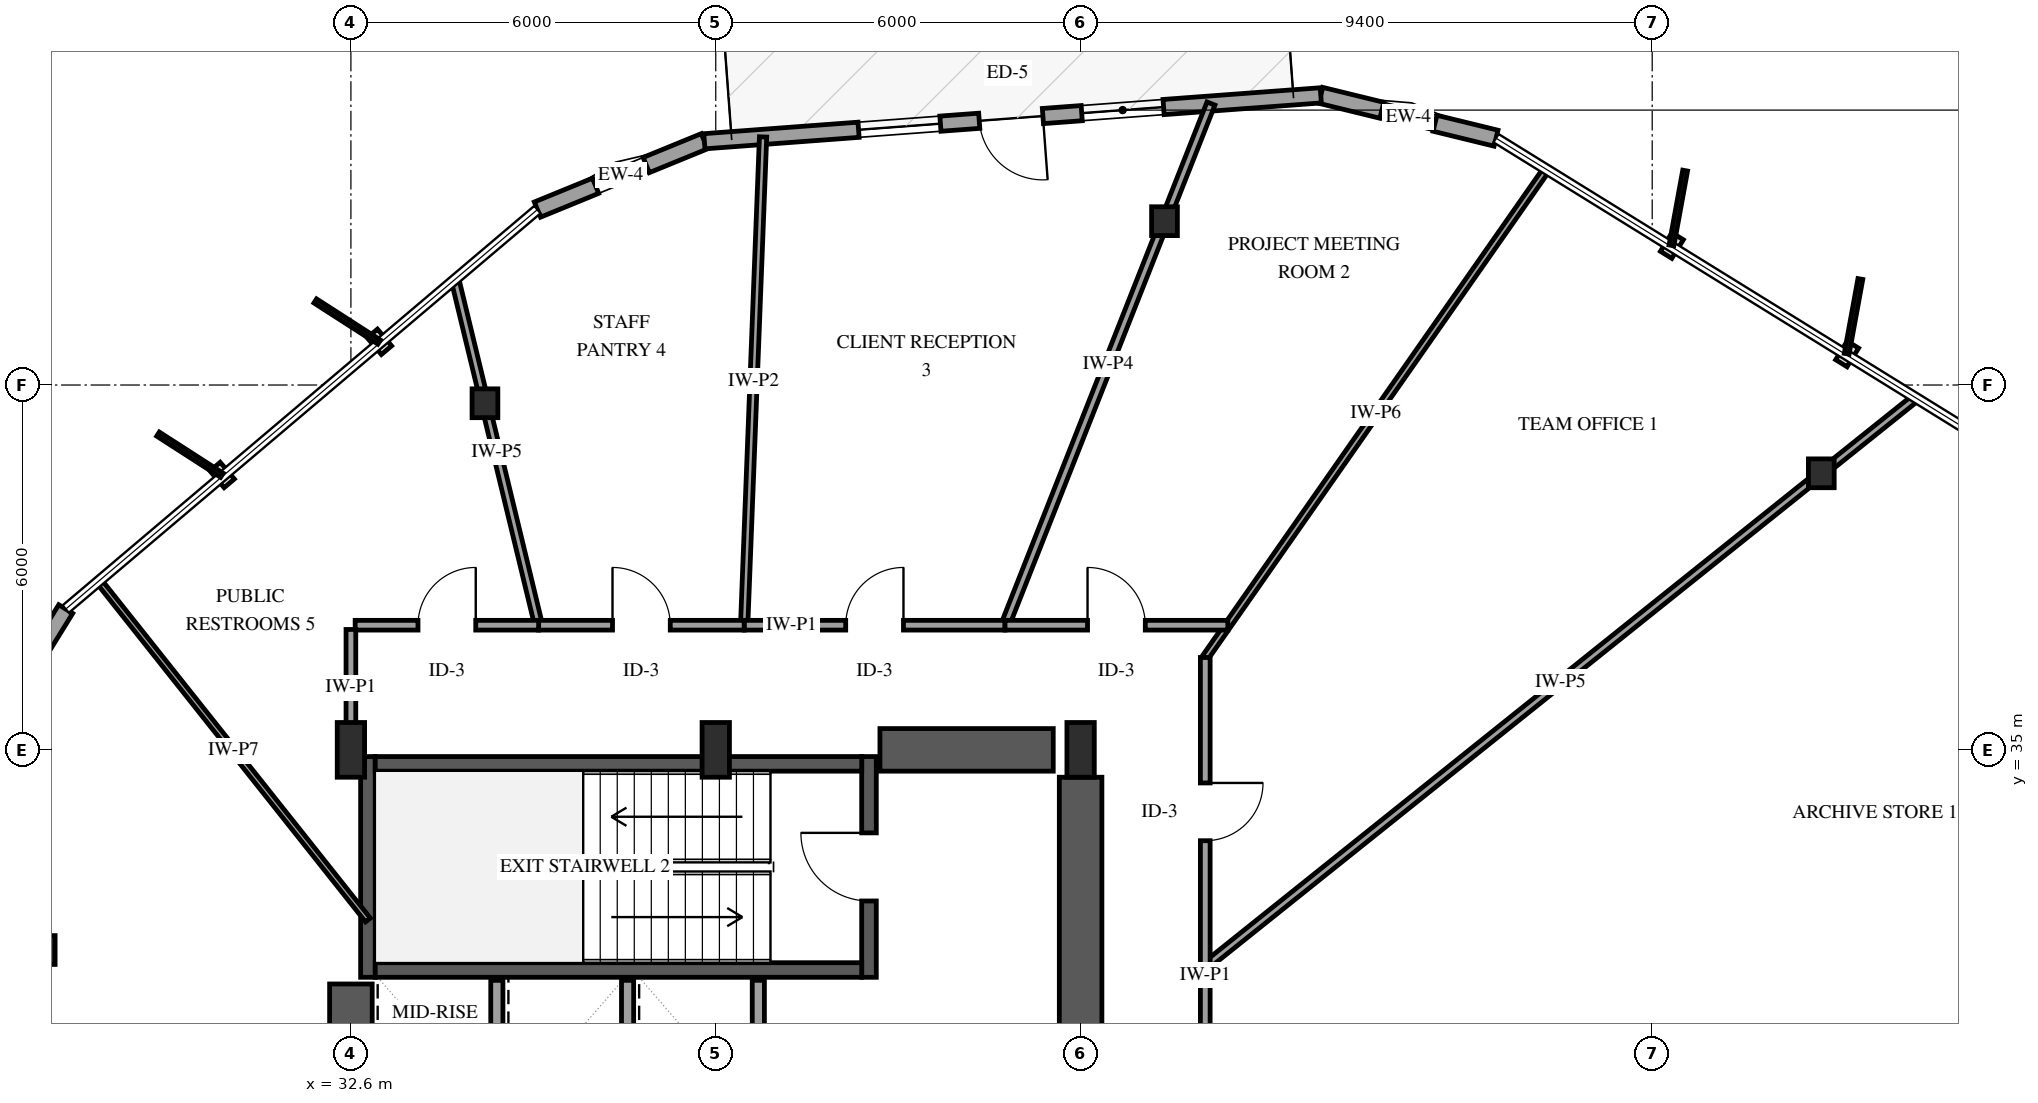
"""IFC4 building model, lengths in metres.
Left out: names, types, materials, properties, quantities, classifications, styles, units other than length and angle.
Written with IfcOpenShell. Run it as: python <this file> out.ifc"""

import sys

from ifc_helpers import new_model, si_unit, direction, frame, frame_2d, origin, origin_2d, place, context, subcontext, project, spatial, rectangle, i_section, extrude, element, fill, save


model = new_model("IFC4")
c1 = context("Model", 3, precision=1e-05, world=origin(), true_north=direction((0.0, 1.0)))
c2 = subcontext(c1, "Body", "Model", "MODEL_VIEW")
j1 = project(units=[si_unit("LENGTHUNIT", "METRE"), si_unit("PLANEANGLEUNIT", "RADIAN")], contexts=[c1])
p1 = place(None, origin())
s1 = spatial("IfcSite", under=j1, at=p1, CompositionType="ELEMENT")
p2 = place(p1, origin())
s2 = spatial("IfcBuilding", under=s1, at=p2, CompositionType="ELEMENT")
p3 = place(p2, frame((0.0, 0.0, 46.6)))
s3 = spatial("IfcBuildingStorey", under=s2, at=p3, CompositionType="ELEMENT", Elevation=46.6)
p4 = place(p3, frame((32.88, 31.26, 0.0), z_axis=(0.0, 0.0, 1.0), x_axis=(0.0, 1.0, 0.0)))
e1 = element("IfcWall", 1, at=p4, inside=s3, PredefinedType="SHEAR", context=c2, shape_type="SweptSolid", body=[
    extrude(rectangle(XDim=3.63, YDim=0.24, at=frame_2d((1.815, 0.0))), origin(), (0.0, 0.0, 1.0), 4.0),
])
p5 = place(p3, frame((41.12, 31.26, 0.0), z_axis=(0.0, 0.0, 1.0), x_axis=(0.0, 1.0, 0.0)))
e2 = element("IfcWall", 2, at=p5, inside=s3, PredefinedType="SHEAR", context=c2, shape_type="SweptSolid", body=[
    extrude(rectangle(XDim=3.63, YDim=0.24, at=frame_2d((1.815, 0.0))), origin(), (0.0, 0.0, 1.0), 4.0),
])
p6 = place(p5, frame((1.255, 0.0, 0.0)))
e3 = element("IfcOpeningElement", 3, at=p6, cuts=e2, PredefinedType="OPENING", context=c2, shape_type="SweptSolid", body=[
    extrude(rectangle(XDim=1.12, YDim=2.15, at=frame_2d((0.56, 1.075))), frame((0.0, 0.13, 0.0), z_axis=(0.0, -1.0, 0.0), x_axis=(1.0, 0.0, 0.0)), (0.0, 0.0, 1.0), 0.26),
])
for number, where, z_axis, x_axis in (
    (4, (33.0, 31.38, 0.0), (0.0, 0.0, 1.0), (1.0, 0.0, 0.0)),
    (5, (33.0, 34.77, 0.0), (0.0, 0.0, 1.0), (1.0, 0.0, 0.0)),
):
    element("IfcWall", number, at=place(p3, frame(where, z_axis=z_axis, x_axis=x_axis)), inside=s3, PredefinedType="SHEAR", context=c2, shape_type="SweptSolid", body=[
        extrude(rectangle(XDim=8.0, YDim=0.24, at=frame_2d((4.0, 0.0))), origin(), (0.0, 0.0, 1.0), 4.0),
    ])
p7 = place(p3, frame((32.6, 18.85, 0.0), z_axis=(0.0, 0.0, 1.0), x_axis=(0.0, 1.0, 0.0)))
e6 = element("IfcWall", 6, at=p7, inside=s3, PredefinedType="SHEAR", context=c2, shape_type="SweptSolid", body=[
    extrude(rectangle(XDim=12.3, YDim=0.7, at=frame_2d((6.15, 0.0))), origin(), (0.0, 0.0, 1.0), 4.0),
])
p8 = place(p3, frame((41.3, 35.0, 0.0), z_axis=(0.0, 0.0, 1.0), x_axis=(1.0, 0.0, 0.0)))
e7 = element("IfcWall", 7, at=p8, inside=s3, PredefinedType="SHEAR", context=c2, shape_type="SweptSolid", body=[
    extrude(rectangle(XDim=2.85, YDim=0.7, at=frame_2d((1.425, 0.0))), origin(), (0.0, 0.0, 1.0), 4.0),
])
p9 = place(p3, frame((44.6, 29.8, 0.0), z_axis=(0.0, 0.0, 1.0), x_axis=(0.0, 1.0, 0.0)))
e8 = element("IfcWall", 8, at=p9, inside=s3, PredefinedType="SHEAR", context=c2, shape_type="SweptSolid", body=[
    extrude(rectangle(XDim=4.75, YDim=0.7, at=frame_2d((2.375, 0.0))), origin(), (0.0, 0.0, 1.0), 4.0),
])
for number, where, z_axis, x_axis in (
    (9, (32.6, 35.0, 0.0), (0.0, 0.0, 1.0), (1.0, 0.0, 0.0)),
    (10, (38.6, 35.0, 0.0), (0.0, 0.0, 1.0), (1.0, 0.0, 0.0)),
    (11, (44.6, 35.0, 0.0), (0.0, 0.0, 1.0), (1.0, 0.0, 0.0)),
):
    element("IfcColumn", number, at=place(p3, frame(where, z_axis=z_axis, x_axis=x_axis)), inside=s3, PredefinedType="PILASTER", context=c2, shape_type="SweptSolid", body=[
        extrude(rectangle(XDim=0.45, YDim=0.9, at=origin_2d()), origin(), (0.0, 0.0, 1.0), 4.0),
    ])
for number, where, z_axis, x_axis in (
    (12, (56.781, 39.548, 0.0), (0.0, 0.0, 1.0), (1.0, 0.0, 0.0)),
    (13, (45.98, 43.694, 0.0), (0.0, 0.0, 1.0), (1.0, 0.0, 0.0)),
    (14, (34.804, 40.7, 0.0), (0.0, 0.0, 1.0), (1.0, 0.0, 0.0)),
    (15, (27.523, 31.708, 0.0), (0.0, 0.0, 1.0), (1.0, 0.0, 0.0)),
):
    element("IfcColumn", number, at=place(p3, frame(where, z_axis=z_axis, x_axis=x_axis)), inside=s3, PredefinedType="COLUMN", context=c2, shape_type="SweptSolid", body=[
        extrude(i_section(OverallWidth=0.424, OverallDepth=0.474, WebThickness=0.048, FlangeThickness=0.077, FilletRadius=0.038, at=origin_2d()), origin(), (0.0, 0.0, 1.0), 4.0),
    ])
p10 = place(p3, frame((51.432, 45.059, 0.0), z_axis=(0.0, 0.0, 1.0), x_axis=(-0.971383395834, 0.237516943182, 0.0)))
e16 = element("IfcWall", 16, at=p10, inside=s3, PredefinedType="SOLIDWALL", context=c2, shape_type="SweptSolid", body=[
    extrude(rectangle(XDim=2.967, YDim=0.27, at=frame_2d((1.483, 0.0))), origin(), (0.0, 0.0, 1.0), 3.079),
])
p11 = place(p10, frame((1.033, 0.0, 0.75)))
e17 = element("IfcOpeningElement", 17, at=p11, cuts=e16, PredefinedType="OPENING", context=c2, shape_type="SweptSolid", body=[
    extrude(rectangle(XDim=0.9, YDim=1.5, at=frame_2d((0.45, 0.75))), frame((0.0, 0.145, 0.0), z_axis=(0.0, -1.0, 0.0), x_axis=(1.0, 0.0, 0.0)), (0.0, 0.0, 1.0), 0.29),
])
p12 = place(p3, frame((38.413, 45.009, 0.0), z_axis=(0.0, 0.0, 1.0), x_axis=(-0.925495818017, -0.378757826102, 0.0)))
e18 = element("IfcWall", 18, at=p12, inside=s3, PredefinedType="SOLIDWALL", context=c2, shape_type="SweptSolid", body=[
    extrude(rectangle(XDim=2.966, YDim=0.27, at=frame_2d((1.483, 0.0))), origin(), (0.0, 0.0, 1.0), 3.079),
])
p13 = place(p12, frame((1.033, 0.0, 0.75)))
e19 = element("IfcOpeningElement", 19, at=p13, cuts=e18, PredefinedType="OPENING", context=c2, shape_type="SweptSolid", body=[
    extrude(rectangle(XDim=0.9, YDim=1.5, at=frame_2d((0.45, 0.75))), frame((0.0, 0.145, 0.0), z_axis=(0.0, -1.0, 0.0), x_axis=(1.0, 0.0, 0.0)), (0.0, 0.0, 1.0), 0.29),
])
p14 = place(p3, frame((48.55, 45.764, 0.0), z_axis=(0.0, 0.0, 1.0), x_axis=(-0.997237065948, -0.07428481877, 0.0)))
e20 = element("IfcWall", 20, at=p14, inside=s3, PredefinedType="SOLIDWALL", context=c2, shape_type="SweptSolid", body=[
    extrude(rectangle(XDim=10.165, YDim=0.25, at=frame_2d((5.083, 0.0))), origin(), (0.0, 0.0, 1.0), 3.079),
])
p15 = place(p14, frame((4.583, 0.0, 0.0)))
e21 = element("IfcOpeningElement", 21, at=p15, cuts=e20, PredefinedType="OPENING", context=c2, shape_type="SweptSolid", body=[
    extrude(rectangle(XDim=1.05, YDim=2.15, at=frame_2d((0.525, 1.075))), frame((0.0, 0.135, 0.0), z_axis=(0.0, -1.0, 0.0), x_axis=(1.0, 0.0, 0.0)), (0.0, 0.0, 1.0), 0.27),
])
p16 = place(p14, frame((2.593, 0.0, 0.72)))
e22 = element("IfcOpeningElement", 22, at=p16, cuts=e20, PredefinedType="OPENING", context=c2, shape_type="SweptSolid", body=[
    extrude(rectangle(XDim=1.35, YDim=1.65, at=frame_2d((0.675, 0.825))), frame((0.0, 0.135, 0.0), z_axis=(0.0, -1.0, 0.0), x_axis=(1.0, 0.0, 0.0)), (0.0, 0.0, 1.0), 0.27),
])
p17 = place(p14, frame((6.273, 0.0, 0.72)))
e23 = element("IfcOpeningElement", 23, at=p17, cuts=e20, PredefinedType="OPENING", context=c2, shape_type="SweptSolid", body=[
    extrude(rectangle(XDim=1.35, YDim=1.65, at=frame_2d((0.675, 0.825))), frame((0.0, 0.135, 0.0), z_axis=(0.0, -1.0, 0.0), x_axis=(1.0, 0.0, 0.0)), (0.0, 0.0, 1.0), 0.27),
])
p18 = place(p3, frame((27.91, 37.315, 0.0), z_axis=(0.0, 0.0, 1.0), x_axis=(-0.526042929665, -0.850458015513, 0.0)))
e24 = element("IfcWall", 24, at=p18, inside=s3, PredefinedType="SOLIDWALL", context=c2, shape_type="SweptSolid", body=[
    extrude(rectangle(XDim=2.967, YDim=0.27, at=frame_2d((1.483, 0.0))), origin(), (0.0, 0.0, 1.0), 3.079),
])
p19 = place(p18, frame((1.033, 0.0, 0.75)))
e25 = element("IfcOpeningElement", 25, at=p19, cuts=e24, PredefinedType="OPENING", context=c2, shape_type="SweptSolid", body=[
    extrude(rectangle(XDim=0.9, YDim=1.5, at=frame_2d((0.45, 0.75))), frame((0.0, 0.145, 0.0), z_axis=(0.0, -1.0, 0.0), x_axis=(1.0, 0.0, 0.0)), (0.0, 0.0, 1.0), 0.29),
])
for number, where, z_axis, x_axis in (
    (26, (35.0, 29.11, 0.0), (0.0, 0.0, 1.0), (0.0, 1.0, 0.0)),
    (27, (37.15, 29.11, 0.0), (0.0, 0.0, 1.0), (0.0, 1.0, 0.0)),
    (28, (39.3, 29.11, 0.0), (0.0, 0.0, 1.0), (0.0, 1.0, 0.0)),
):
    element("IfcWall", number, at=place(p3, frame(where, z_axis=z_axis, x_axis=x_axis)), inside=s3, PredefinedType="SOLIDWALL", context=c2, shape_type="SweptSolid", body=[
        extrude(rectangle(XDim=2.1, YDim=0.2, at=frame_2d((1.05, 0.0))), origin(), (0.0, 0.0, 1.0), 3.7),
    ])
p20 = place(p3, frame((46.65, 31.442, 0.0), z_axis=(0.0, 0.0, 1.0), x_axis=(0.780814683149, 0.624762699414, 0.0)))
e29 = element("IfcWall", 29, at=p20, inside=s3, PredefinedType="PARTITIONING", context=c2, shape_type="SweptSolid", body=[
    extrude(rectangle(XDim=14.963, YDim=0.13, at=frame_2d((7.481, 0.0))), origin(), (0.0, 0.0, 1.0), 3.7),
])
p21 = place(p3, frame((46.65, 36.519, 0.0), z_axis=(0.0, 0.0, 1.0), x_axis=(0.5729335383, 0.81960183058, 0.0)))
e30 = element("IfcWall", 30, at=p21, inside=s3, PredefinedType="PARTITIONING", context=c2, shape_type="SweptSolid", body=[
    extrude(rectangle(XDim=9.794, YDim=0.11, at=frame_2d((4.897, 0.0))), origin(), (0.0, 0.0, 1.0), 3.7),
])
p22 = place(p3, frame((43.357, 37.05, 0.0), z_axis=(0.0, 0.0, 1.0), x_axis=(0.367220172229, 0.930134046849, 0.0)))
e31 = element("IfcWall", 31, at=p22, inside=s3, PredefinedType="PARTITIONING", context=c2, shape_type="SweptSolid", body=[
    extrude(rectangle(XDim=9.223, YDim=0.14, at=frame_2d((4.612, 0.0))), origin(), (0.0, 0.0, 1.0), 2.995),
])
p23 = place(p3, frame((39.067, 37.05, 0.0), z_axis=(0.0, 0.0, 1.0), x_axis=(0.038704976086, 0.999250681674, 0.0)))
e32 = element("IfcWall", 32, at=p23, inside=s3, PredefinedType="PARTITIONING", context=c2, shape_type="SweptSolid", body=[
    extrude(rectangle(XDim=8.036, YDim=0.12, at=frame_2d((4.018, 0.0))), origin(), (0.0, 0.0, 1.0), 3.7),
])
p24 = place(p3, frame((32.88, 32.202, 0.0), z_axis=(0.0, 0.0, 1.0), x_axis=(-0.62182955162, 0.783152608839, 0.0)))
e33 = element("IfcWall", 33, at=p24, inside=s3, PredefinedType="PARTITIONING", context=c2, shape_type="SweptSolid", body=[
    extrude(rectangle(XDim=7.117, YDim=0.1, at=frame_2d((3.559, 0.0))), origin(), (0.0, 0.0, 1.0), 3.7),
])
p25 = place(p3, frame((35.687, 37.05, 0.0), z_axis=(0.0, 0.0, 1.0), x_axis=(-0.235165303417, 0.971955389958, 0.0)))
e34 = element("IfcWall", 34, at=p25, inside=s3, PredefinedType="PARTITIONING", context=c2, shape_type="SweptSolid", body=[
    extrude(rectangle(XDim=5.851, YDim=0.13, at=frame_2d((2.926, 0.0))), origin(), (0.0, 0.0, 1.0), 2.995),
])
p26 = place(p3, frame((46.65, 36.519, 0.0), z_axis=(0.0, 0.0, 1.0), x_axis=(0.0, -1.0, 0.0)))
e35 = element("IfcWall", 35, at=p26, inside=s3, PredefinedType="PARTITIONING", context=c2, shape_type="SweptSolid", body=[
    extrude(rectangle(XDim=5.077, YDim=0.16, at=frame_2d((2.539, 0.0))), origin(), (0.0, 0.0, 1.0), 3.7),
])
p27 = place(p26, frame((2.063, 0.0, 0.0)))
e36 = element("IfcOpeningElement", 36, at=p27, cuts=e35, PredefinedType="OPENING", context=c2, shape_type="SweptSolid", body=[
    extrude(rectangle(XDim=0.95, YDim=2.15, at=frame_2d((0.475, 1.075))), frame((0.0, 0.09, 0.0), z_axis=(0.0, -1.0, 0.0), x_axis=(1.0, 0.0, 0.0)), (0.0, 0.0, 1.0), 0.18),
])
p28 = place(p3, frame((46.65, 31.442, 0.0), z_axis=(0.0, 0.0, 1.0), x_axis=(0.0, -1.0, 0.0)))
e37 = element("IfcWall", 37, at=p28, inside=s3, PredefinedType="PARTITIONING", context=c2, shape_type="SweptSolid", body=[
    extrude(rectangle(XDim=4.849, YDim=0.16, at=frame_2d((2.424, 0.0))), origin(), (0.0, 0.0, 1.0), 3.7),
])
p29 = place(p28, frame((1.95, 0.0, 0.0)))
e38 = element("IfcOpeningElement", 38, at=p29, cuts=e37, PredefinedType="OPENING", context=c2, shape_type="SweptSolid", body=[
    extrude(rectangle(XDim=0.95, YDim=2.15, at=frame_2d((0.475, 1.075))), frame((0.0, 0.09, 0.0), z_axis=(0.0, -1.0, 0.0), x_axis=(1.0, 0.0, 0.0)), (0.0, 0.0, 1.0), 0.18),
])
p30 = place(p3, frame((39.067, 37.05, 0.0), z_axis=(0.0, 0.0, 1.0), x_axis=(1.0, 0.0, 0.0)))
e39 = element("IfcWall", 39, at=p30, inside=s3, PredefinedType="PARTITIONING", context=c2, shape_type="SweptSolid", body=[
    extrude(rectangle(XDim=4.29, YDim=0.16, at=frame_2d((2.145, 0.0))), origin(), (0.0, 0.0, 1.0), 3.7),
])
p31 = place(p30, frame((1.67, 0.0, 0.0)))
e40 = element("IfcOpeningElement", 40, at=p31, cuts=e39, PredefinedType="OPENING", context=c2, shape_type="SweptSolid", body=[
    extrude(rectangle(XDim=0.95, YDim=2.15, at=frame_2d((0.475, 1.075))), frame((0.0, 0.09, 0.0), z_axis=(0.0, -1.0, 0.0), x_axis=(1.0, 0.0, 0.0)), (0.0, 0.0, 1.0), 0.18),
])
p32 = place(p3, frame((43.357, 37.05, 0.0), z_axis=(0.0, 0.0, 1.0), x_axis=(1.0, 0.0, 0.0)))
e41 = element("IfcWall", 41, at=p32, inside=s3, PredefinedType="PARTITIONING", context=c2, shape_type="SweptSolid", body=[
    extrude(rectangle(XDim=3.664, YDim=0.16, at=frame_2d((1.832, 0.0))), origin(), (0.0, 0.0, 1.0), 3.7),
])
p33 = place(p32, frame((1.357, 0.0, 0.0)))
e42 = element("IfcOpeningElement", 42, at=p33, cuts=e41, PredefinedType="OPENING", context=c2, shape_type="SweptSolid", body=[
    extrude(rectangle(XDim=0.95, YDim=2.15, at=frame_2d((0.475, 1.075))), frame((0.0, 0.09, 0.0), z_axis=(0.0, -1.0, 0.0), x_axis=(1.0, 0.0, 0.0)), (0.0, 0.0, 1.0), 0.18),
])
p34 = place(p3, frame((35.687, 37.05, 0.0), z_axis=(0.0, 0.0, 1.0), x_axis=(1.0, 0.0, 0.0)))
e43 = element("IfcWall", 43, at=p34, inside=s3, PredefinedType="PARTITIONING", context=c2, shape_type="SweptSolid", body=[
    extrude(rectangle(XDim=3.38, YDim=0.16, at=frame_2d((1.69, 0.0))), origin(), (0.0, 0.0, 1.0), 3.7),
])
p35 = place(p34, frame((1.215, 0.0, 0.0)))
e44 = element("IfcOpeningElement", 44, at=p35, cuts=e43, PredefinedType="OPENING", context=c2, shape_type="SweptSolid", body=[
    extrude(rectangle(XDim=0.95, YDim=2.15, at=frame_2d((0.475, 1.075))), frame((0.0, 0.09, 0.0), z_axis=(0.0, -1.0, 0.0), x_axis=(1.0, 0.0, 0.0)), (0.0, 0.0, 1.0), 0.18),
])
p36 = place(p3, frame((32.67, 37.05, 0.0), z_axis=(0.0, 0.0, 1.0), x_axis=(1.0, 0.0, 0.0)))
e45 = element("IfcWall", 45, at=p36, inside=s3, PredefinedType="PARTITIONING", context=c2, shape_type="SweptSolid", body=[
    extrude(rectangle(XDim=3.017, YDim=0.16, at=frame_2d((1.509, 0.0))), origin(), (0.0, 0.0, 1.0), 3.7),
])
p37 = place(p36, frame((1.033, 0.0, 0.0)))
e46 = element("IfcOpeningElement", 46, at=p37, cuts=e45, PredefinedType="OPENING", context=c2, shape_type="SweptSolid", body=[
    extrude(rectangle(XDim=0.95, YDim=2.15, at=frame_2d((0.475, 1.075))), frame((0.0, 0.09, 0.0), z_axis=(0.0, -1.0, 0.0), x_axis=(1.0, 0.0, 0.0)), (0.0, 0.0, 1.0), 0.18),
])
p38 = place(p3, frame((32.6, 35.07, 0.0), z_axis=(0.0, 0.0, 1.0), x_axis=(0.0, 1.0, 0.0)))
e47 = element("IfcWall", 47, at=p38, inside=s3, PredefinedType="PARTITIONING", context=c2, shape_type="SweptSolid", body=[
    extrude(rectangle(XDim=1.91, YDim=0.16, at=frame_2d((0.955, 0.0))), origin(), (0.0, 0.0, 1.0), 3.7),
])
p39 = place(p11, origin())
e48 = element("IfcWindow", 48, at=p39, inside=s3, PartitioningType="SINGLE_PANEL", PredefinedType="WINDOW", context=c2, shape_type="SweptSolid", body=[
    extrude(rectangle(XDim=0.9, YDim=1.5, at=frame_2d((0.45, 0.75))), frame((0.0, 0.03, 0.0), z_axis=(0.0, -1.0, 0.0), x_axis=(1.0, 0.0, 0.0)), (0.0, 0.0, 1.0), 0.06),
])
fill(e17, e48)
p40 = place(p13, origin())
e49 = element("IfcWindow", 49, at=p40, inside=s3, PartitioningType="SINGLE_PANEL", PredefinedType="WINDOW", context=c2, shape_type="SweptSolid", body=[
    extrude(rectangle(XDim=0.9, YDim=1.5, at=frame_2d((0.45, 0.75))), frame((0.0, 0.03, 0.0), z_axis=(0.0, -1.0, 0.0), x_axis=(1.0, 0.0, 0.0)), (0.0, 0.0, 1.0), 0.06),
])
fill(e19, e49)
p41 = place(p15, origin())
e50 = element("IfcDoor", 50, at=p41, inside=s3, OperationType="SINGLE_SWING_LEFT", PredefinedType="DOOR", context=c2, shape_type="SweptSolid", body=[
    extrude(rectangle(XDim=1.05, YDim=2.15, at=frame_2d((0.525, 1.075))), frame((0.0, 0.025, 0.0), z_axis=(0.0, -1.0, 0.0), x_axis=(1.0, 0.0, 0.0)), (0.0, 0.0, 1.0), 0.05),
])
fill(e21, e50)
p42 = place(p16, origin())
e51 = element("IfcWindow", 51, at=p42, inside=s3, PartitioningType="SINGLE_PANEL", PredefinedType="WINDOW", context=c2, shape_type="SweptSolid", body=[
    extrude(rectangle(XDim=1.35, YDim=1.65, at=frame_2d((0.675, 0.825))), frame((0.0, 0.03, 0.0), z_axis=(0.0, -1.0, 0.0), x_axis=(1.0, 0.0, 0.0)), (0.0, 0.0, 1.0), 0.06),
])
fill(e22, e51)
p43 = place(p17, origin())
e52 = element("IfcWindow", 52, at=p43, inside=s3, PartitioningType="SINGLE_PANEL", PredefinedType="WINDOW", context=c2, shape_type="SweptSolid", body=[
    extrude(rectangle(XDim=1.35, YDim=1.65, at=frame_2d((0.675, 0.825))), frame((0.0, 0.03, 0.0), z_axis=(0.0, -1.0, 0.0), x_axis=(1.0, 0.0, 0.0)), (0.0, 0.0, 1.0), 0.06),
])
fill(e23, e52)
p44 = place(p6, origin())
e53 = element("IfcDoor", 53, at=p44, inside=s3, OperationType="SINGLE_SWING_RIGHT", PredefinedType="DOOR", context=c2, shape_type="SweptSolid", body=[
    extrude(rectangle(XDim=1.12, YDim=2.15, at=frame_2d((0.56, 1.075))), frame((0.0, 0.025, 0.0), z_axis=(0.0, -1.0, 0.0), x_axis=(1.0, 0.0, 0.0)), (0.0, 0.0, 1.0), 0.05),
])
fill(e3, e53)
p45 = place(p27, origin())
e54 = element("IfcDoor", 54, at=p45, inside=s3, OperationType="SINGLE_SWING_LEFT", PredefinedType="DOOR", context=c2, shape_type="SweptSolid", body=[
    extrude(rectangle(XDim=0.95, YDim=2.15, at=frame_2d((0.475, 1.075))), frame((0.0, 0.025, 0.0), z_axis=(0.0, -1.0, 0.0), x_axis=(1.0, 0.0, 0.0)), (0.0, 0.0, 1.0), 0.05),
])
fill(e36, e54)
p46 = place(p31, origin())
e55 = element("IfcDoor", 55, at=p46, inside=s3, OperationType="SINGLE_SWING_RIGHT", PredefinedType="DOOR", context=c2, shape_type="SweptSolid", body=[
    extrude(rectangle(XDim=0.95, YDim=2.15, at=frame_2d((0.475, 1.075))), frame((0.0, 0.025, 0.0), z_axis=(0.0, -1.0, 0.0), x_axis=(1.0, 0.0, 0.0)), (0.0, 0.0, 1.0), 0.05),
])
fill(e40, e55)
p47 = place(p33, origin())
e56 = element("IfcDoor", 56, at=p47, inside=s3, OperationType="SINGLE_SWING_LEFT", PredefinedType="DOOR", context=c2, shape_type="SweptSolid", body=[
    extrude(rectangle(XDim=0.95, YDim=2.15, at=frame_2d((0.475, 1.075))), frame((0.0, 0.025, 0.0), z_axis=(0.0, -1.0, 0.0), x_axis=(1.0, 0.0, 0.0)), (0.0, 0.0, 1.0), 0.05),
])
fill(e42, e56)
p48 = place(p35, origin())
e57 = element("IfcDoor", 57, at=p48, inside=s3, OperationType="SINGLE_SWING_LEFT", PredefinedType="DOOR", context=c2, shape_type="SweptSolid", body=[
    extrude(rectangle(XDim=0.95, YDim=2.15, at=frame_2d((0.475, 1.075))), frame((0.0, 0.025, 0.0), z_axis=(0.0, -1.0, 0.0), x_axis=(1.0, 0.0, 0.0)), (0.0, 0.0, 1.0), 0.05),
])
fill(e44, e57)
p49 = place(p37, origin())
e58 = element("IfcDoor", 58, at=p49, inside=s3, OperationType="SINGLE_SWING_RIGHT", PredefinedType="DOOR", context=c2, shape_type="SweptSolid", body=[
    extrude(rectangle(XDim=0.95, YDim=2.15, at=frame_2d((0.475, 1.075))), frame((0.0, 0.025, 0.0), z_axis=(0.0, -1.0, 0.0), x_axis=(1.0, 0.0, 0.0)), (0.0, 0.0, 1.0), 0.05),
])
fill(e46, e58)
save(model, sys.argv[1])
